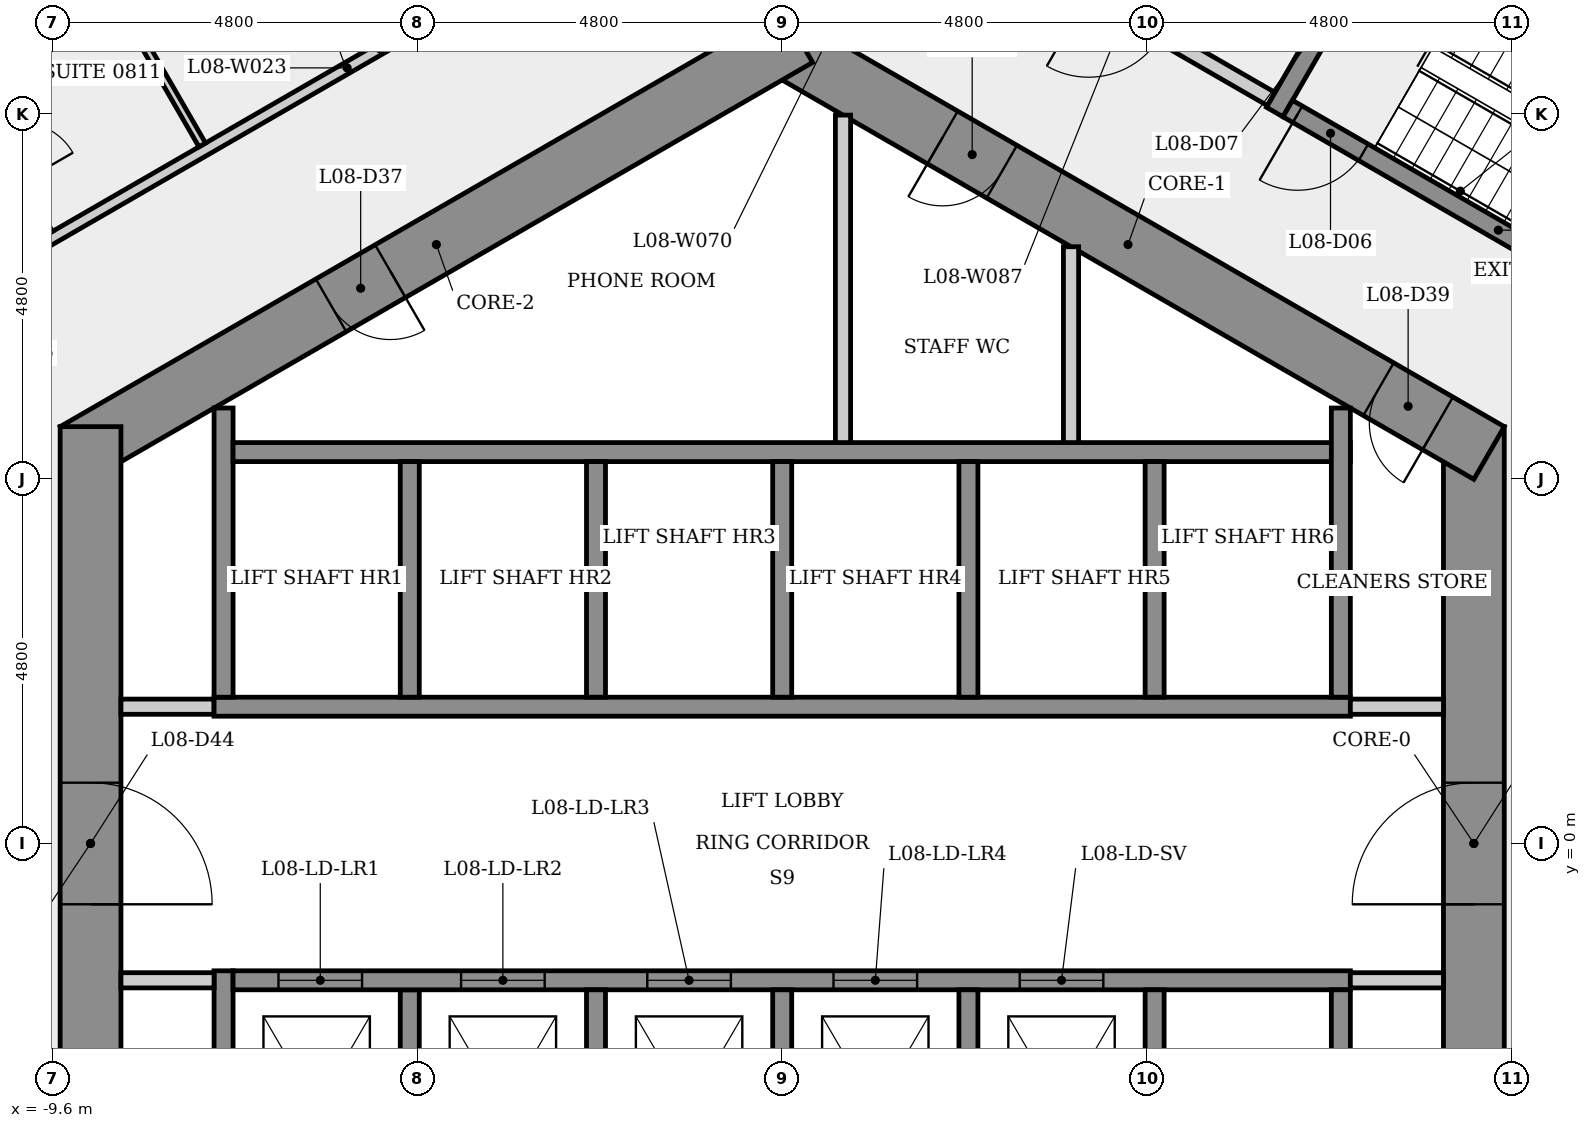
"""IFC4 building model, lengths in metres.
Left out: names, types, materials, properties, quantities, classifications, styles, units other than length and angle.
Written with IfcOpenShell. Run it as: python <this file> out.ifc"""

import sys

from ifc_helpers import new_model, si_unit, direction, frame, frame_2d, origin, place, context, subcontext, project, spatial, rectangle, extrude, element, fill, save


model = new_model("IFC4")
c1 = context("Model", 3, precision=1e-05, world=origin(), true_north=direction((0.0, 1.0)))
c2 = subcontext(c1, "Body", "Model", "MODEL_VIEW")
j1 = project(units=[si_unit("LENGTHUNIT", "METRE"), si_unit("PLANEANGLEUNIT", "RADIAN")], contexts=[c1])
p1 = place(None, origin())
s1 = spatial("IfcSite", under=j1, at=p1, CompositionType="ELEMENT")
p2 = place(p1, origin())
s2 = spatial("IfcBuilding", under=s1, at=p2, CompositionType="ELEMENT")
p3 = place(p2, frame((0.0, 0.0, 35.7)))
s3 = spatial("IfcBuildingStorey", under=s2, at=p3, CompositionType="ELEMENT", Elevation=35.7)
p4 = place(p3, frame((9.1, -5.485, 0.0), z_axis=(0.0, 0.0, 1.0), x_axis=(0.0, 1.0, 0.0)))
e1 = element("IfcWall", 1, at=p4, inside=s3, PredefinedType="SHEAR", context=c2, shape_type="SweptSolid", body=[
    extrude(rectangle(XDim=10.97, YDim=0.8, at=frame_2d((5.485, 0.0))), origin(), (0.0, 0.0, 1.0), 3.4),
])
p5 = place(p4, frame((4.685, 0.0, 0.0)))
e2 = element("IfcOpeningElement", 2, at=p5, cuts=e1, PredefinedType="OPENING", context=c2, shape_type="SweptSolid", body=[
    extrude(rectangle(XDim=1.6, YDim=2.1, at=frame_2d((0.8, 1.05))), frame((0.0, 0.41, 0.0), z_axis=(0.0, -1.0, 0.0), x_axis=(1.0, 0.0, 0.0)), (0.0, 0.0, 1.0), 0.82),
])
p6 = place(p3, frame((9.3, 5.138, 0.0), z_axis=(0.0, 0.0, 1.0), x_axis=(-0.866023993627, 0.500002442456, 0.0)))
e3 = element("IfcWall", 3, at=p6, inside=s3, PredefinedType="SHEAR", context=c2, shape_type="SweptSolid", body=[
    extrude(rectangle(XDim=10.97, YDim=0.8, at=frame_2d((5.485, 0.0))), origin(), (0.0, 0.0, 1.0), 3.4),
])
p7 = place(p6, frame((7.403, 0.0, 0.0)))
e4 = element("IfcOpeningElement", 4, at=p7, cuts=e3, PredefinedType="OPENING", context=c2, shape_type="SweptSolid", body=[
    extrude(rectangle(XDim=0.9, YDim=2.1, at=frame_2d((0.45, 1.05))), frame((0.0, 0.41, 0.0), z_axis=(0.0, -1.0, 0.0), x_axis=(1.0, 0.0, 0.0)), (0.0, 0.0, 1.0), 0.82),
])
p8 = place(p6, frame((0.78, 0.0, 0.0)))
e5 = element("IfcOpeningElement", 5, at=p8, cuts=e3, PredefinedType="OPENING", context=c2, shape_type="SweptSolid", body=[
    extrude(rectangle(XDim=0.9, YDim=2.1, at=frame_2d((0.45, 1.05))), frame((0.0, 0.41, 0.0), z_axis=(0.0, -1.0, 0.0), x_axis=(1.0, 0.0, 0.0)), (0.0, 0.0, 1.0), 0.82),
])
p9 = place(p3, frame((0.2, 10.623, 0.0), z_axis=(0.0, 0.0, 1.0), x_axis=(-0.866023993627, -0.500002442456, 0.0)))
e6 = element("IfcWall", 6, at=p9, inside=s3, PredefinedType="SHEAR", context=c2, shape_type="SweptSolid", body=[
    extrude(rectangle(XDim=10.97, YDim=0.8, at=frame_2d((5.485, 0.0))), origin(), (0.0, 0.0, 1.0), 3.4),
])
p10 = place(p9, frame((6.185, 0.0, 0.0)))
e7 = element("IfcOpeningElement", 7, at=p10, cuts=e6, PredefinedType="OPENING", context=c2, shape_type="SweptSolid", body=[
    extrude(rectangle(XDim=0.9, YDim=2.1, at=frame_2d((0.45, 1.05))), frame((0.0, 0.41, 0.0), z_axis=(0.0, -1.0, 0.0), x_axis=(1.0, 0.0, 0.0)), (0.0, 0.0, 1.0), 0.82),
])
p11 = place(p3, frame((-9.1, 5.485, 0.0), z_axis=(0.0, 0.0, 1.0), x_axis=(0.0, -1.0, 0.0)))
e8 = element("IfcWall", 8, at=p11, inside=s3, PredefinedType="SHEAR", context=c2, shape_type="SweptSolid", body=[
    extrude(rectangle(XDim=10.97, YDim=0.8, at=frame_2d((5.485, 0.0))), origin(), (0.0, 0.0, 1.0), 3.4),
])
p12 = place(p11, frame((4.685, 0.0, 0.0)))
e9 = element("IfcOpeningElement", 9, at=p12, cuts=e8, PredefinedType="OPENING", context=c2, shape_type="SweptSolid", body=[
    extrude(rectangle(XDim=1.6, YDim=2.1, at=frame_2d((0.8, 1.05))), frame((0.0, 0.41, 0.0), z_axis=(0.0, -1.0, 0.0), x_axis=(1.0, 0.0, 0.0)), (0.0, 0.0, 1.0), 0.82),
])
p13 = place(p3, frame((-10.826, 7.26, 0.0), z_axis=(0.0, 0.0, 1.0), x_axis=(0.866022388473, 0.500005222637, 0.0)))
e10 = element("IfcWall", 10, at=p13, inside=s3, PredefinedType="PARTITIONING", context=c2, shape_type="SweptSolid", body=[
    extrude(rectangle(XDim=11.783, YDim=0.15, at=frame_2d((5.892, 0.0))), origin(), (0.0, 0.0, 1.0), 3.05),
])
p14 = place(p13, frame((5.89, 0.0, 0.0)))
e11 = element("IfcOpeningElement", 11, at=p14, cuts=e10, PredefinedType="OPENING", context=c2, shape_type="SweptSolid", body=[
    extrude(rectangle(XDim=1.0, YDim=2.1, at=frame_2d((0.5, 1.05))), frame((0.0, 0.085, 0.0), z_axis=(0.0, -1.0, 0.0), x_axis=(1.0, 0.0, 0.0)), (0.0, 0.0, 1.0), 0.17),
])
p15 = place(p3, frame((-8.836, 11.18, 0.0), z_axis=(0.0, 0.0, 1.0), x_axis=(-0.865999189711, -0.500045401358, 0.0)))
e12 = element("IfcWall", 12, at=p15, inside=s3, PredefinedType="PARTITIONING", context=c2, shape_type="SweptSolid", body=[
    extrude(rectangle(XDim=2.225, YDim=0.1, at=frame_2d((1.112, 0.0))), origin(), (0.0, 0.0, 1.0), 3.05),
])
p16 = place(p3, frame((-12.135, 16.994, 0.0), z_axis=(0.0, 0.0, 1.0), x_axis=(0.499997670926, -0.866026748472, 0.0)))
e13 = element("IfcWall", 13, at=p16, inside=s3, PredefinedType="PARTITIONING", context=c2, shape_type="SweptSolid", body=[
    extrude(rectangle(XDim=9.01, YDim=0.1, at=frame_2d((4.505, 0.0))), origin(), (0.0, 0.0, 1.0), 3.05),
])
p17 = place(p3, frame((-8.7, 1.8, 0.0), z_axis=(0.0, 0.0, 1.0), x_axis=(1.0, 0.0, 0.0)))
e14 = element("IfcWall", 14, at=p17, inside=s3, PredefinedType="PARTITIONING", context=c2, shape_type="SweptSolid", body=[
    extrude(rectangle(XDim=1.225, YDim=0.2, at=frame_2d((0.613, 0.0))), origin(), (0.0, 0.0, 1.0), 3.05),
])
p18 = place(p3, frame((-7.475, 1.8, 0.0), z_axis=(0.0, 0.0, 1.0), x_axis=(1.0, 0.0, 0.0)))
e15 = element("IfcWall", 15, at=p18, inside=s3, PredefinedType="SHEAR", context=c2, shape_type="SweptSolid", body=[
    extrude(rectangle(XDim=14.95, YDim=0.25, at=frame_2d((7.475, 0.0))), origin(), (0.0, 0.0, 1.0), 3.05),
])
p19 = place(p3, frame((-7.35, -5.73, 0.0), z_axis=(0.0, 0.0, 1.0), x_axis=(0.0, 1.0, 0.0)))
e16 = element("IfcWall", 16, at=p19, inside=s3, PredefinedType="SHEAR", context=c2, shape_type="SweptSolid", body=[
    extrude(rectangle(XDim=4.055, YDim=0.25, at=frame_2d((2.028, 0.0))), origin(), (0.0, 0.0, 1.0), 3.05),
])
p20 = place(p3, frame((-7.35, 1.925, 0.0), z_axis=(0.0, 0.0, 1.0), x_axis=(0.0, 1.0, 0.0)))
e17 = element("IfcWall", 17, at=p20, inside=s3, PredefinedType="SHEAR", context=c2, shape_type="SweptSolid", body=[
    extrude(rectangle(XDim=3.805, YDim=0.25, at=frame_2d((1.903, 0.0))), origin(), (0.0, 0.0, 1.0), 3.05),
])
p21 = place(p3, frame((-7.225, 5.15, 0.0), z_axis=(0.0, 0.0, 1.0), x_axis=(1.0, 0.0, 0.0)))
e18 = element("IfcWall", 18, at=p21, inside=s3, PredefinedType="SHEAR", context=c2, shape_type="SweptSolid", body=[
    extrude(rectangle(XDim=14.7, YDim=0.25, at=frame_2d((7.35, 0.0))), origin(), (0.0, 0.0, 1.0), 3.05),
])
p22 = place(p3, frame((-7.475, -1.8, 0.0), z_axis=(0.0, 0.0, 1.0), x_axis=(-1.0, 0.0, 0.0)))
e19 = element("IfcWall", 19, at=p22, inside=s3, PredefinedType="PARTITIONING", context=c2, shape_type="SweptSolid", body=[
    extrude(rectangle(XDim=1.225, YDim=0.2, at=frame_2d((0.613, 0.0))), origin(), (0.0, 0.0, 1.0), 3.05),
])
for number, where, z_axis, x_axis in (
    (20, (-4.9, -1.925, 0.0), (0.0, 0.0, 1.0), (0.0, -1.0, 0.0)),
    (21, (-4.9, 5.025, 0.0), (0.0, 0.0, 1.0), (0.0, -1.0, 0.0)),
):
    element("IfcWall", number, at=place(p3, frame(where, z_axis=z_axis, x_axis=x_axis)), inside=s3, PredefinedType="SHEAR", context=c2, shape_type="SweptSolid", body=[
        extrude(rectangle(XDim=3.1, YDim=0.25, at=frame_2d((1.55, 0.0))), origin(), (0.0, 0.0, 1.0), 3.4),
    ])
p23 = place(p3, frame((-7.225, -1.8, 0.0), z_axis=(0.0, 0.0, 1.0), x_axis=(1.0, 0.0, 0.0)))
e22 = element("IfcWall", 22, at=p23, inside=s3, PredefinedType="SHEAR", context=c2, shape_type="SweptSolid", body=[
    extrude(rectangle(XDim=14.7, YDim=0.25, at=frame_2d((7.35, 0.0))), origin(), (0.0, 0.0, 1.0), 3.05),
])
p24 = place(p23, frame((0.597, 0.0, 0.0)))
e23 = element("IfcOpeningElement", 23, at=p24, cuts=e22, PredefinedType="OPENING", context=c2, shape_type="SweptSolid", body=[
    extrude(rectangle(XDim=1.1, YDim=2.1, at=frame_2d((0.55, 1.05))), frame((0.0, 0.135, 0.0), z_axis=(0.0, -1.0, 0.0), x_axis=(1.0, 0.0, 0.0)), (0.0, 0.0, 1.0), 0.27),
])
p25 = place(p23, frame((3.0, 0.0, 0.0)))
e24 = element("IfcOpeningElement", 24, at=p25, cuts=e22, PredefinedType="OPENING", context=c2, shape_type="SweptSolid", body=[
    extrude(rectangle(XDim=1.1, YDim=2.1, at=frame_2d((0.55, 1.05))), frame((0.0, 0.135, 0.0), z_axis=(0.0, -1.0, 0.0), x_axis=(1.0, 0.0, 0.0)), (0.0, 0.0, 1.0), 0.27),
])
p26 = place(p23, frame((5.45, 0.0, 0.0)))
e25 = element("IfcOpeningElement", 25, at=p26, cuts=e22, PredefinedType="OPENING", context=c2, shape_type="SweptSolid", body=[
    extrude(rectangle(XDim=1.1, YDim=2.1, at=frame_2d((0.55, 1.05))), frame((0.0, 0.135, 0.0), z_axis=(0.0, -1.0, 0.0), x_axis=(1.0, 0.0, 0.0)), (0.0, 0.0, 1.0), 0.27),
])
p27 = place(p23, frame((7.9, 0.0, 0.0)))
e26 = element("IfcOpeningElement", 26, at=p27, cuts=e22, PredefinedType="OPENING", context=c2, shape_type="SweptSolid", body=[
    extrude(rectangle(XDim=1.1, YDim=2.1, at=frame_2d((0.55, 1.05))), frame((0.0, 0.135, 0.0), z_axis=(0.0, -1.0, 0.0), x_axis=(1.0, 0.0, 0.0)), (0.0, 0.0, 1.0), 0.27),
])
p28 = place(p23, frame((10.35, 0.0, 0.0)))
e27 = element("IfcOpeningElement", 27, at=p28, cuts=e22, PredefinedType="OPENING", context=c2, shape_type="SweptSolid", body=[
    extrude(rectangle(XDim=1.1, YDim=2.1, at=frame_2d((0.55, 1.05))), frame((0.0, 0.135, 0.0), z_axis=(0.0, -1.0, 0.0), x_axis=(1.0, 0.0, 0.0)), (0.0, 0.0, 1.0), 0.27),
])
for number, where, z_axis, x_axis in (
    (28, (-2.45, -1.925, 0.0), (0.0, 0.0, 1.0), (0.0, -1.0, 0.0)),
    (29, (-2.45, 5.025, 0.0), (0.0, 0.0, 1.0), (0.0, -1.0, 0.0)),
    (30, (0.0, -1.925, 0.0), (0.0, 0.0, 1.0), (0.0, -1.0, 0.0)),
    (31, (0.0, 5.025, 0.0), (0.0, 0.0, 1.0), (0.0, -1.0, 0.0)),
):
    element("IfcWall", number, at=place(p3, frame(where, z_axis=z_axis, x_axis=x_axis)), inside=s3, PredefinedType="SHEAR", context=c2, shape_type="SweptSolid", body=[
        extrude(rectangle(XDim=3.1, YDim=0.25, at=frame_2d((1.55, 0.0))), origin(), (0.0, 0.0, 1.0), 3.4),
    ])
p29 = place(p3, frame((0.8, 9.584, 0.0), z_axis=(0.0, 0.0, 1.0), x_axis=(0.0, -1.0, 0.0)))
e32 = element("IfcWall", 32, at=p29, inside=s3, PredefinedType="PARTITIONING", context=c2, shape_type="SweptSolid", body=[
    extrude(rectangle(XDim=4.309, YDim=0.2, at=frame_2d((2.155, 0.0))), origin(), (0.0, 0.0, 1.0), 3.05),
])
for number, where, z_axis, x_axis in (
    (33, (2.45, -1.925, 0.0), (0.0, 0.0, 1.0), (0.0, -1.0, 0.0)),
    (34, (2.45, 5.025, 0.0), (0.0, 0.0, 1.0), (0.0, -1.0, 0.0)),
):
    element("IfcWall", number, at=place(p3, frame(where, z_axis=z_axis, x_axis=x_axis)), inside=s3, PredefinedType="SHEAR", context=c2, shape_type="SweptSolid", body=[
        extrude(rectangle(XDim=3.1, YDim=0.25, at=frame_2d((1.55, 0.0))), origin(), (0.0, 0.0, 1.0), 3.4),
    ])
p30 = place(p3, frame((3.8, 7.852, 0.0), z_axis=(0.0, 0.0, 1.0), x_axis=(0.0, -1.0, 0.0)))
e35 = element("IfcWall", 35, at=p30, inside=s3, PredefinedType="PARTITIONING", context=c2, shape_type="SweptSolid", body=[
    extrude(rectangle(XDim=2.577, YDim=0.2, at=frame_2d((1.289, 0.0))), origin(), (0.0, 0.0, 1.0), 3.05),
])
for number, where, z_axis, x_axis in (
    (36, (4.9, -1.925, 0.0), (0.0, 0.0, 1.0), (0.0, -1.0, 0.0)),
    (37, (4.9, 5.025, 0.0), (0.0, 0.0, 1.0), (0.0, -1.0, 0.0)),
):
    element("IfcWall", number, at=place(p3, frame(where, z_axis=z_axis, x_axis=x_axis)), inside=s3, PredefinedType="SHEAR", context=c2, shape_type="SweptSolid", body=[
        extrude(rectangle(XDim=3.1, YDim=0.25, at=frame_2d((1.55, 0.0))), origin(), (0.0, 0.0, 1.0), 3.4),
    ])
p31 = place(p3, frame((6.435, 9.795, 0.0), z_axis=(0.0, 0.0, 1.0), x_axis=(-0.866012907634, 0.500021643343, 0.0)))
e38 = element("IfcWall", 38, at=p31, inside=s3, PredefinedType="PARTITIONING", context=c2, shape_type="SweptSolid", body=[
    extrude(rectangle(XDim=4.45, YDim=0.2, at=frame_2d((2.225, 0.0))), origin(), (0.0, 0.0, 1.0), 3.05),
])
p32 = place(p31, frame((1.675, 0.0, 0.0)))
e39 = element("IfcOpeningElement", 39, at=p32, cuts=e38, PredefinedType="OPENING", context=c2, shape_type="SweptSolid", body=[
    extrude(rectangle(XDim=1.1, YDim=2.1, at=frame_2d((0.55, 1.05))), frame((0.0, 0.11, 0.0), z_axis=(0.0, -1.0, 0.0), x_axis=(1.0, 0.0, 0.0)), (0.0, 0.0, 1.0), 0.22),
])
p33 = place(p3, frame((6.48, 9.624, 0.0), z_axis=(0.0, 0.0, 1.0), x_axis=(0.500017246033, 0.866015446554, 0.0)))
e40 = element("IfcWall", 40, at=p33, inside=s3, PredefinedType="SHEAR", context=c2, shape_type="SweptSolid", body=[
    extrude(rectangle(XDim=3.25, YDim=0.25, at=frame_2d((1.625, 0.0))), origin(), (0.0, 0.0, 1.0), 3.05),
])
p34 = place(p33, frame((1.125, 0.0, 0.0)))
e41 = element("IfcOpeningElement", 41, at=p34, cuts=e40, PredefinedType="OPENING", context=c2, shape_type="SweptSolid", body=[
    extrude(rectangle(XDim=1.0, YDim=2.1, at=frame_2d((0.5, 1.05))), frame((0.0, 0.135, 0.0), z_axis=(0.0, -1.0, 0.0), x_axis=(1.0, 0.0, 0.0)), (0.0, 0.0, 1.0), 0.27),
])
p35 = place(p3, frame((7.475, 1.8, 0.0), z_axis=(0.0, 0.0, 1.0), x_axis=(1.0, 0.0, 0.0)))
e42 = element("IfcWall", 42, at=p35, inside=s3, PredefinedType="PARTITIONING", context=c2, shape_type="SweptSolid", body=[
    extrude(rectangle(XDim=1.225, YDim=0.2, at=frame_2d((0.613, 0.0))), origin(), (0.0, 0.0, 1.0), 3.05),
])
for number, where, z_axis, x_axis in (
    (43, (7.35, -1.925, 0.0), (0.0, 0.0, 1.0), (0.0, -1.0, 0.0)),
    (44, (7.35, 5.73, 0.0), (0.0, 0.0, 1.0), (0.0, -1.0, 0.0)),
):
    element("IfcWall", number, at=place(p3, frame(where, z_axis=z_axis, x_axis=x_axis)), inside=s3, PredefinedType="SHEAR", context=c2, shape_type="SweptSolid", body=[
        extrude(rectangle(XDim=3.805, YDim=0.25, at=frame_2d((1.903, 0.0))), origin(), (0.0, 0.0, 1.0), 3.05),
    ])
p36 = place(p3, frame((8.151, 12.268, 0.0), z_axis=(0.0, 0.0, 1.0), x_axis=(0.866025499775, -0.499999833739, 0.0)))
e45 = element("IfcWall", 45, at=p36, inside=s3, PredefinedType="SHEAR", context=c2, shape_type="SweptSolid", body=[
    extrude(rectangle(XDim=6.4, YDim=0.25, at=frame_2d((3.2, 0.0))), origin(), (0.0, 0.0, 1.0), 3.05),
])
p37 = place(p3, frame((8.7, -1.8, 0.0), z_axis=(0.0, 0.0, 1.0), x_axis=(-1.0, 0.0, 0.0)))
e46 = element("IfcWall", 46, at=p37, inside=s3, PredefinedType="PARTITIONING", context=c2, shape_type="SweptSolid", body=[
    extrude(rectangle(XDim=1.225, YDim=0.2, at=frame_2d((0.613, 0.0))), origin(), (0.0, 0.0, 1.0), 3.05),
])
p38 = place(p3, frame((12.194, 6.47, 0.0), z_axis=(0.0, 0.0, 1.0), x_axis=(-0.866025499775, 0.499999833739, 0.0)))
e47 = element("IfcWall", 47, at=p38, inside=s3, PredefinedType="SHEAR", context=c2, shape_type="SweptSolid", body=[
    extrude(rectangle(XDim=6.4, YDim=0.25, at=frame_2d((3.2, 0.0))), origin(), (0.0, 0.0, 1.0), 3.05),
])
p39 = place(p38, frame((5.25, 0.0, 0.0)))
e48 = element("IfcOpeningElement", 48, at=p39, cuts=e47, PredefinedType="OPENING", context=c2, shape_type="SweptSolid", body=[
    extrude(rectangle(XDim=1.0, YDim=2.1, at=frame_2d((0.5, 1.05))), frame((0.0, 0.135, 0.0), z_axis=(0.0, -1.0, 0.0), x_axis=(1.0, 0.0, 0.0)), (0.0, 0.0, 1.0), 0.27),
])
p40 = place(p24, origin())
e49 = element("IfcDoor", 49, at=p40, inside=s3, OperationType="SLIDING_TO_LEFT", PredefinedType="DOOR", context=c2, shape_type="SweptSolid", body=[
    extrude(rectangle(XDim=1.1, YDim=2.1, at=frame_2d((0.55, 1.05))), frame((0.0, 0.025, 0.0), z_axis=(0.0, -1.0, 0.0), x_axis=(1.0, 0.0, 0.0)), (0.0, 0.0, 1.0), 0.05),
])
fill(e23, e49)
p41 = place(p25, origin())
e50 = element("IfcDoor", 50, at=p41, inside=s3, OperationType="SLIDING_TO_LEFT", PredefinedType="DOOR", context=c2, shape_type="SweptSolid", body=[
    extrude(rectangle(XDim=1.1, YDim=2.1, at=frame_2d((0.55, 1.05))), frame((0.0, 0.025, 0.0), z_axis=(0.0, -1.0, 0.0), x_axis=(1.0, 0.0, 0.0)), (0.0, 0.0, 1.0), 0.05),
])
fill(e24, e50)
p42 = place(p26, origin())
e51 = element("IfcDoor", 51, at=p42, inside=s3, OperationType="SLIDING_TO_LEFT", PredefinedType="DOOR", context=c2, shape_type="SweptSolid", body=[
    extrude(rectangle(XDim=1.1, YDim=2.1, at=frame_2d((0.55, 1.05))), frame((0.0, 0.025, 0.0), z_axis=(0.0, -1.0, 0.0), x_axis=(1.0, 0.0, 0.0)), (0.0, 0.0, 1.0), 0.05),
])
fill(e25, e51)
p43 = place(p27, origin())
e52 = element("IfcDoor", 52, at=p43, inside=s3, OperationType="SLIDING_TO_LEFT", PredefinedType="DOOR", context=c2, shape_type="SweptSolid", body=[
    extrude(rectangle(XDim=1.1, YDim=2.1, at=frame_2d((0.55, 1.05))), frame((0.0, 0.025, 0.0), z_axis=(0.0, -1.0, 0.0), x_axis=(1.0, 0.0, 0.0)), (0.0, 0.0, 1.0), 0.05),
])
fill(e26, e52)
p44 = place(p28, origin())
e53 = element("IfcDoor", 53, at=p44, inside=s3, OperationType="SLIDING_TO_LEFT", PredefinedType="DOOR", context=c2, shape_type="SweptSolid", body=[
    extrude(rectangle(XDim=1.1, YDim=2.1, at=frame_2d((0.55, 1.05))), frame((0.0, 0.025, 0.0), z_axis=(0.0, -1.0, 0.0), x_axis=(1.0, 0.0, 0.0)), (0.0, 0.0, 1.0), 0.05),
])
fill(e27, e53)
p45 = place(p39, origin())
e54 = element("IfcDoor", 54, at=p45, inside=s3, OperationType="SINGLE_SWING_RIGHT", PredefinedType="DOOR", context=c2, shape_type="SweptSolid", body=[
    extrude(rectangle(XDim=1.0, YDim=2.1, at=frame_2d((0.5, 1.05))), frame((0.0, 0.025, 0.0), z_axis=(0.0, -1.0, 0.0), x_axis=(1.0, 0.0, 0.0)), (0.0, 0.0, 1.0), 0.05),
])
fill(e48, e54)
p46 = place(p14, origin())
e55 = element("IfcDoor", 55, at=p46, inside=s3, OperationType="SINGLE_SWING_RIGHT", PredefinedType="DOOR", context=c2, shape_type="SweptSolid", body=[
    extrude(rectangle(XDim=1.0, YDim=2.1, at=frame_2d((0.5, 1.05))), frame((0.0, 0.025, 0.0), z_axis=(0.0, -1.0, 0.0), x_axis=(1.0, 0.0, 0.0)), (0.0, 0.0, 1.0), 0.05),
])
fill(e11, e55)
p47 = place(p10, origin())
e56 = element("IfcDoor", 56, at=p47, inside=s3, OperationType="SINGLE_SWING_LEFT", PredefinedType="DOOR", context=c2, shape_type="SweptSolid", body=[
    extrude(rectangle(XDim=0.9, YDim=2.1, at=frame_2d((0.45, 1.05))), frame((0.0, 0.025, 0.0), z_axis=(0.0, -1.0, 0.0), x_axis=(1.0, 0.0, 0.0)), (0.0, 0.0, 1.0), 0.05),
])
fill(e7, e56)
p48 = place(p7, origin())
e57 = element("IfcDoor", 57, at=p48, inside=s3, OperationType="SINGLE_SWING_RIGHT", PredefinedType="DOOR", context=c2, shape_type="SweptSolid", body=[
    extrude(rectangle(XDim=0.9, YDim=2.1, at=frame_2d((0.45, 1.05))), frame((0.0, 0.025, 0.0), z_axis=(0.0, -1.0, 0.0), x_axis=(1.0, 0.0, 0.0)), (0.0, 0.0, 1.0), 0.05),
])
fill(e4, e57)
p49 = place(p8, origin())
e58 = element("IfcDoor", 58, at=p49, inside=s3, OperationType="SINGLE_SWING_LEFT", PredefinedType="DOOR", context=c2, shape_type="SweptSolid", body=[
    extrude(rectangle(XDim=0.9, YDim=2.1, at=frame_2d((0.45, 1.05))), frame((0.0, 0.025, 0.0), z_axis=(0.0, -1.0, 0.0), x_axis=(1.0, 0.0, 0.0)), (0.0, 0.0, 1.0), 0.05),
])
fill(e5, e58)
p50 = place(p5, origin())
e59 = element("IfcDoor", 59, at=p50, inside=s3, OperationType="SINGLE_SWING_LEFT", PredefinedType="DOOR", context=c2, shape_type="SweptSolid", body=[
    extrude(rectangle(XDim=1.6, YDim=2.1, at=frame_2d((0.8, 1.05))), frame((0.0, 0.025, 0.0), z_axis=(0.0, -1.0, 0.0), x_axis=(1.0, 0.0, 0.0)), (0.0, 0.0, 1.0), 0.05),
])
fill(e2, e59)
p51 = place(p12, origin())
e60 = element("IfcDoor", 60, at=p51, inside=s3, OperationType="SINGLE_SWING_RIGHT", PredefinedType="DOOR", context=c2, shape_type="SweptSolid", body=[
    extrude(rectangle(XDim=1.6, YDim=2.1, at=frame_2d((0.8, 1.05))), frame((0.0, 0.025, 0.0), z_axis=(0.0, -1.0, 0.0), x_axis=(1.0, 0.0, 0.0)), (0.0, 0.0, 1.0), 0.05),
])
fill(e9, e60)
save(model, sys.argv[1])
